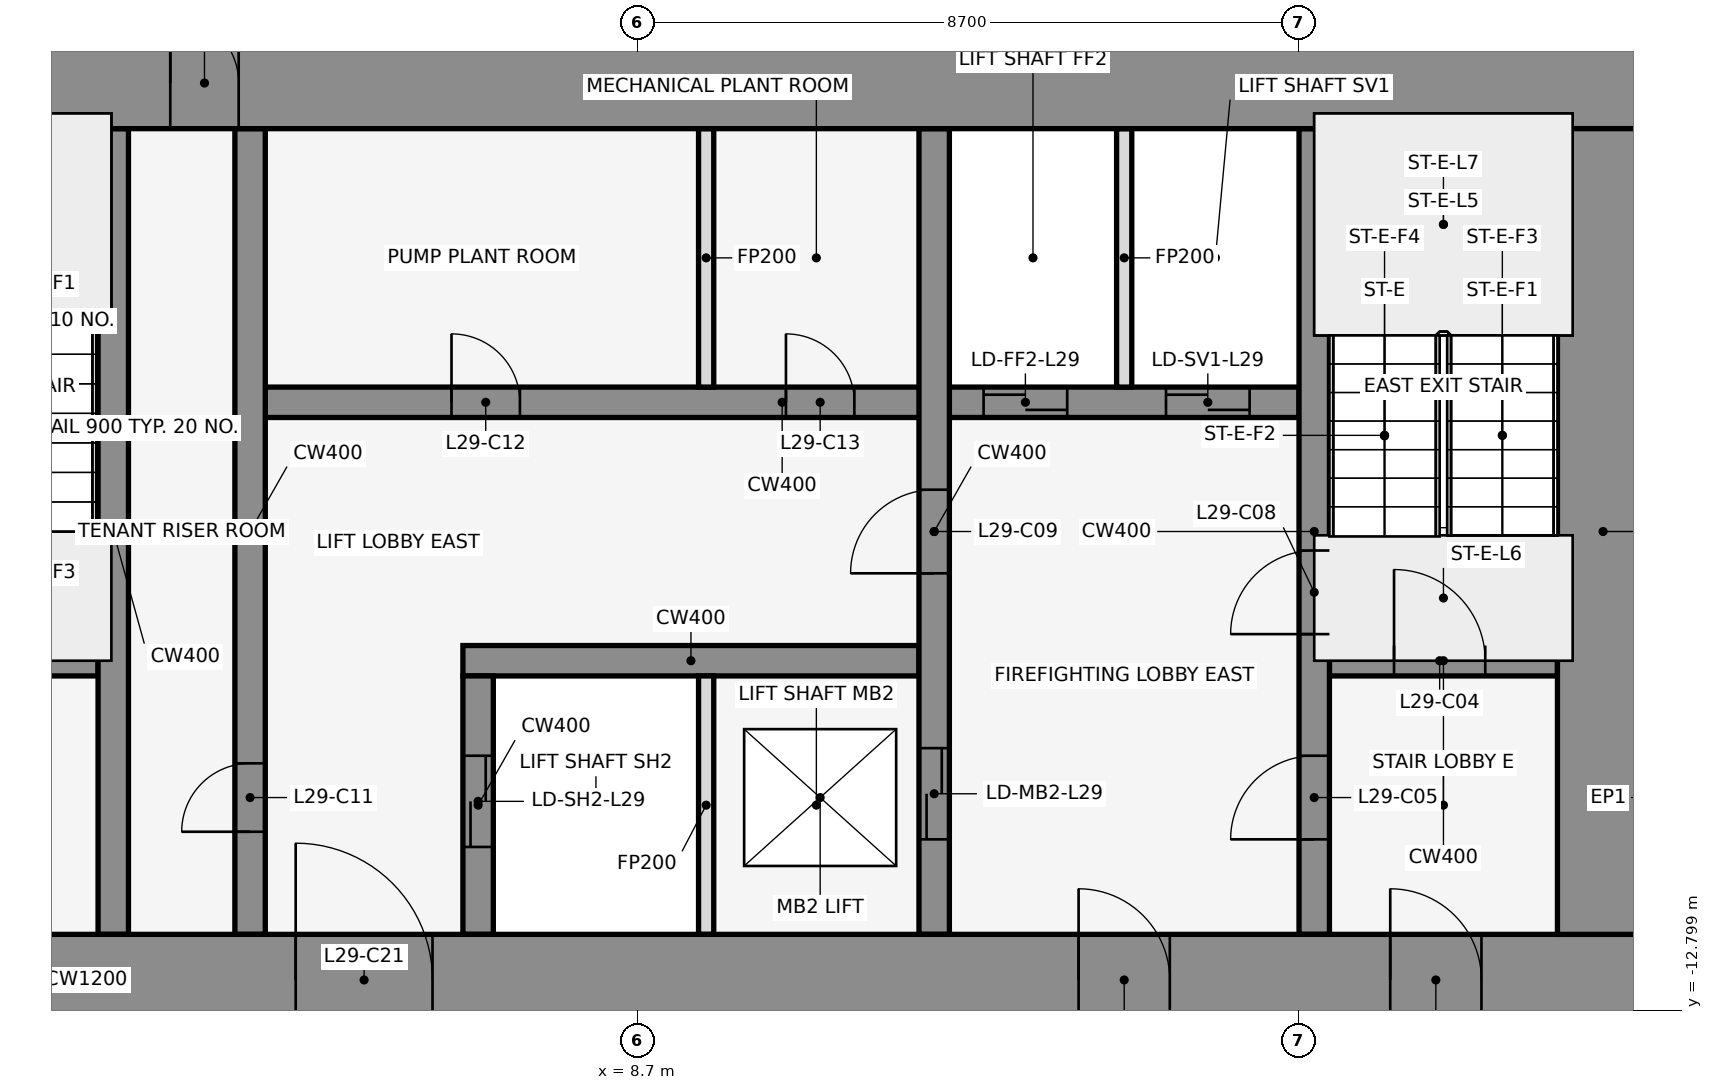
"""IFC4 building model, lengths in metres.
Left out: names, types, materials, properties, quantities, classifications, styles, units other than length and angle.
Written with IfcOpenShell. Run it as: python <this file> out.ifc"""

import sys

from ifc_helpers import new_model, si_unit, direction, frame, frame_2d, origin, place, context, subcontext, project, spatial, rectangle, extrude, element, fill, save


model = new_model("IFC4")
c1 = context("Model", 3, precision=1e-05, world=origin(), true_north=direction((0.0, 1.0)))
c2 = subcontext(c1, "Body", "Model", "MODEL_VIEW")
j1 = project(units=[si_unit("LENGTHUNIT", "METRE"), si_unit("PLANEANGLEUNIT", "RADIAN")], contexts=[c1])
p1 = place(None, origin())
s1 = spatial("IfcSite", under=j1, at=p1, CompositionType="ELEMENT")
p2 = place(p1, origin())
s2 = spatial("IfcBuilding", under=s1, at=p2, CompositionType="ELEMENT")
p3 = place(p2, frame((0.0, 0.0, 135.0)))
s3 = spatial("IfcBuildingStorey", under=s2, at=p3, CompositionType="ELEMENT", Elevation=135.0)
for number, where, z_axis, x_axis in (
    (1, (16.432, -0.105, 0.0), (0.0, 0.0, 1.0), (-0.84, 0.543, 0.0)),
    (2, (1.901, 1.08, 0.0), (0.0, 0.0, 1.0), (-0.84, -0.543, 0.0)),
):
    element("IfcWall", number, at=place(p3, frame(where, z_axis=z_axis, x_axis=x_axis)), inside=s3, PredefinedType="STANDARD", context=c2, shape_type="SweptSolid", body=[
        extrude(rectangle(XDim=2.183, YDim=0.25, at=frame_2d((1.091, 0.0))), origin(), (0.0, 0.0, 1.0), 5.25),
    ])
p4 = place(p3, frame((-1.6, -8.2, 0.0), z_axis=(0.0, 0.0, 1.0), x_axis=(1.0, 0.0, 0.0)))
e3 = element("IfcWall", 3, at=p4, inside=s3, PredefinedType="SHEAR", context=c2, shape_type="SweptSolid", body=[
    extrude(rectangle(XDim=3.2, YDim=0.4, at=frame_2d((1.6, 0.0))), origin(), (0.0, 0.0, 1.0), 5.4),
])
p5 = place(p4, frame((1.05, 0.0, 0.0)))
e4 = element("IfcOpeningElement", 4, at=p5, cuts=e3, PredefinedType="OPENING", context=c2, shape_type="SweptSolid", body=[
    extrude(rectangle(XDim=1.2, YDim=2.1, at=frame_2d((0.6, 1.05))), frame((0.0, 0.212, 0.0), z_axis=(0.0, -1.0, 0.0), x_axis=(1.0, 0.0, 0.0)), (0.0, 0.0, 1.0), 0.424),
])
p6 = place(p3, frame((6.4, -8.2, 0.0), z_axis=(0.0, 0.0, 1.0), x_axis=(1.0, 0.0, 0.0)))
e5 = element("IfcWall", 5, at=p6, inside=s3, PredefinedType="SHEAR", context=c2, shape_type="SweptSolid", body=[
    extrude(rectangle(XDim=6.0, YDim=0.4, at=frame_2d((3.0, 0.0))), origin(), (0.0, 0.0, 1.0), 5.4),
])
p7 = place(p3, frame((17.8, -8.2, 0.0), z_axis=(0.0, 0.0, 1.0), x_axis=(1.0, 0.0, 0.0)))
e6 = element("IfcWall", 6, at=p7, inside=s3, PredefinedType="SHEAR", context=c2, shape_type="SweptSolid", body=[
    extrude(rectangle(XDim=3.0, YDim=0.4, at=frame_2d((1.5, 0.0))), origin(), (0.0, 0.0, 1.0), 5.4),
])
p8 = place(p7, frame((0.85, 0.0, 0.0)))
e7 = element("IfcOpeningElement", 7, at=p8, cuts=e6, PredefinedType="OPENING", context=c2, shape_type="SweptSolid", body=[
    extrude(rectangle(XDim=1.2, YDim=2.1, at=frame_2d((0.6, 1.05))), frame((0.0, 0.212, 0.0), z_axis=(0.0, -1.0, 0.0), x_axis=(1.0, 0.0, 0.0)), (0.0, 0.0, 1.0), 0.424),
])
p9 = place(p3, frame((3.8, -4.8, 0.0), z_axis=(0.0, 0.0, 1.0), x_axis=(1.0, 0.0, 0.0)))
e8 = element("IfcWall", 8, at=p9, inside=s3, PredefinedType="SHEAR", context=c2, shape_type="SweptSolid", body=[
    extrude(rectangle(XDim=13.6, YDim=0.4, at=frame_2d((6.8, 0.0))), origin(), (0.0, 0.0, 1.0), 5.4),
])
p10 = place(p9, frame((9.45, 0.0, 0.0)))
e9 = element("IfcOpeningElement", 9, at=p10, cuts=e8, PredefinedType="OPENING", context=c2, shape_type="SweptSolid", body=[
    extrude(rectangle(XDim=1.1, YDim=2.1, at=frame_2d((0.55, 1.05))), frame((0.0, 0.212, 0.0), z_axis=(0.0, -1.0, 0.0), x_axis=(1.0, 0.0, 0.0)), (0.0, 0.0, 1.0), 0.424),
])
p11 = place(p9, frame((11.85, 0.0, 0.0)))
e10 = element("IfcOpeningElement", 10, at=p11, cuts=e8, PredefinedType="OPENING", context=c2, shape_type="SweptSolid", body=[
    extrude(rectangle(XDim=1.1, YDim=2.1, at=frame_2d((0.55, 1.05))), frame((0.0, 0.212, 0.0), z_axis=(0.0, -1.0, 0.0), x_axis=(1.0, 0.0, 0.0)), (0.0, 0.0, 1.0), 0.424),
])
p12 = place(p9, frame((2.45, 0.0, 0.0)))
e11 = element("IfcOpeningElement", 11, at=p12, cuts=e8, PredefinedType="OPENING", context=c2, shape_type="SweptSolid", body=[
    extrude(rectangle(XDim=0.9, YDim=2.1, at=frame_2d((0.45, 1.05))), frame((0.0, 0.212, 0.0), z_axis=(0.0, -1.0, 0.0), x_axis=(1.0, 0.0, 0.0)), (0.0, 0.0, 1.0), 0.424),
])
p13 = place(p9, frame((6.85, 0.0, 0.0)))
e12 = element("IfcOpeningElement", 12, at=p13, cuts=e8, PredefinedType="OPENING", context=c2, shape_type="SweptSolid", body=[
    extrude(rectangle(XDim=0.9, YDim=2.1, at=frame_2d((0.45, 1.05))), frame((0.0, 0.212, 0.0), z_axis=(0.0, -1.0, 0.0), x_axis=(1.0, 0.0, 0.0)), (0.0, 0.0, 1.0), 0.424),
])
p14 = place(p3, frame((1.8, -11.8, 0.0), z_axis=(0.0, 0.0, 1.0), x_axis=(0.0, 1.0, 0.0)))
e13 = element("IfcWall", 13, at=p14, inside=s3, PredefinedType="SHEAR", context=c2, shape_type="SweptSolid", body=[
    extrude(rectangle(XDim=10.6, YDim=0.4, at=frame_2d((5.3, 0.0))), origin(), (0.0, 0.0, 1.0), 5.4),
])
p15 = place(p3, frame((3.6, -11.8, 0.0), z_axis=(0.0, 0.0, 1.0), x_axis=(0.0, 1.0, 0.0)))
e14 = element("IfcWall", 14, at=p15, inside=s3, PredefinedType="SHEAR", context=c2, shape_type="SweptSolid", body=[
    extrude(rectangle(XDim=10.6, YDim=0.4, at=frame_2d((5.3, 0.0))), origin(), (0.0, 0.0, 1.0), 5.4),
])
p16 = place(p15, frame((1.35, 0.0, 0.0)))
e15 = element("IfcOpeningElement", 15, at=p16, cuts=e14, PredefinedType="OPENING", context=c2, shape_type="SweptSolid", body=[
    extrude(rectangle(XDim=0.9, YDim=2.1, at=frame_2d((0.45, 1.05))), frame((0.0, 0.212, 0.0), z_axis=(0.0, -1.0, 0.0), x_axis=(1.0, 0.0, 0.0)), (0.0, 0.0, 1.0), 0.424),
])
p17 = place(p3, frame((6.6, -11.8, 0.0), z_axis=(0.0, 0.0, 1.0), x_axis=(0.0, 1.0, 0.0)))
e16 = element("IfcWall", 16, at=p17, inside=s3, PredefinedType="SHEAR", context=c2, shape_type="SweptSolid", body=[
    extrude(rectangle(XDim=3.4, YDim=0.4, at=frame_2d((1.7, 0.0))), origin(), (0.0, 0.0, 1.0), 5.4),
])
p18 = place(p17, frame((1.15, 0.0, 0.0)))
e17 = element("IfcOpeningElement", 17, at=p18, cuts=e16, PredefinedType="OPENING", context=c2, shape_type="SweptSolid", body=[
    extrude(rectangle(XDim=1.2, YDim=2.1, at=frame_2d((0.6, 1.05))), frame((0.0, 0.212, 0.0), z_axis=(0.0, -1.0, 0.0), x_axis=(1.0, 0.0, 0.0)), (0.0, 0.0, 1.0), 0.424),
])
for number, where, z_axis, x_axis in (
    (18, (9.6, -11.8, 0.0), (0.0, 0.0, 1.0), (0.0, 1.0, 0.0)),
    (19, (9.6, -4.6, 0.0), (0.0, 0.0, 1.0), (0.0, 1.0, 0.0)),
):
    element("IfcWall", number, at=place(p3, frame(where, z_axis=z_axis, x_axis=x_axis)), inside=s3, PredefinedType="PARTITIONING", context=c2, shape_type="SweptSolid", body=[
        extrude(rectangle(XDim=3.4, YDim=0.2, at=frame_2d((1.7, 0.0))), origin(), (0.0, 0.0, 1.0), 4.24),
    ])
p19 = place(p3, frame((12.6, -11.8, 0.0), z_axis=(0.0, 0.0, 1.0), x_axis=(0.0, 1.0, 0.0)))
e20 = element("IfcWall", 20, at=p19, inside=s3, PredefinedType="SHEAR", context=c2, shape_type="SweptSolid", body=[
    extrude(rectangle(XDim=10.6, YDim=0.4, at=frame_2d((5.3, 0.0))), origin(), (0.0, 0.0, 1.0), 5.4),
])
p20 = place(p19, frame((1.25, 0.0, 0.0)))
e21 = element("IfcOpeningElement", 21, at=p20, cuts=e20, PredefinedType="OPENING", context=c2, shape_type="SweptSolid", body=[
    extrude(rectangle(XDim=1.2, YDim=2.1, at=frame_2d((0.6, 1.05))), frame((0.0, 0.212, 0.0), z_axis=(0.0, -1.0, 0.0), x_axis=(1.0, 0.0, 0.0)), (0.0, 0.0, 1.0), 0.424),
])
p21 = place(p19, frame((4.75, 0.0, 0.0)))
e22 = element("IfcOpeningElement", 22, at=p21, cuts=e20, PredefinedType="OPENING", context=c2, shape_type="SweptSolid", body=[
    extrude(rectangle(XDim=1.1, YDim=2.1, at=frame_2d((0.55, 1.05))), frame((0.0, 0.212, 0.0), z_axis=(0.0, -1.0, 0.0), x_axis=(1.0, 0.0, 0.0)), (0.0, 0.0, 1.0), 0.424),
])
p22 = place(p3, frame((15.1, -4.6, 0.0), z_axis=(0.0, 0.0, 1.0), x_axis=(0.0, 1.0, 0.0)))
e23 = element("IfcWall", 23, at=p22, inside=s3, PredefinedType="PARTITIONING", context=c2, shape_type="SweptSolid", body=[
    extrude(rectangle(XDim=3.4, YDim=0.2, at=frame_2d((1.7, 0.0))), origin(), (0.0, 0.0, 1.0), 4.24),
])
p23 = place(p3, frame((17.6, -11.8, 0.0), z_axis=(0.0, 0.0, 1.0), x_axis=(0.0, 1.0, 0.0)))
e24 = element("IfcWall", 24, at=p23, inside=s3, PredefinedType="SHEAR", context=c2, shape_type="SweptSolid", body=[
    extrude(rectangle(XDim=10.6, YDim=0.4, at=frame_2d((5.3, 0.0))), origin(), (0.0, 0.0, 1.0), 5.4),
])
p24 = place(p23, frame((1.25, 0.0, 0.0)))
e25 = element("IfcOpeningElement", 25, at=p24, cuts=e24, PredefinedType="OPENING", context=c2, shape_type="SweptSolid", body=[
    extrude(rectangle(XDim=1.1, YDim=2.1, at=frame_2d((0.55, 1.05))), frame((0.0, 0.212, 0.0), z_axis=(0.0, -1.0, 0.0), x_axis=(1.0, 0.0, 0.0)), (0.0, 0.0, 1.0), 0.424),
])
p25 = place(p23, frame((3.95, 0.0, 0.0)))
e26 = element("IfcOpeningElement", 26, at=p25, cuts=e24, PredefinedType="OPENING", context=c2, shape_type="SweptSolid", body=[
    extrude(rectangle(XDim=1.1, YDim=2.1, at=frame_2d((0.55, 1.05))), frame((0.0, 0.212, 0.0), z_axis=(0.0, -1.0, 0.0), x_axis=(1.0, 0.0, 0.0)), (0.0, 0.0, 1.0), 0.424),
])
p26 = place(p3, frame((-22.0, -0.6, 0.0), z_axis=(0.0, 0.0, 1.0), x_axis=(1.0, 0.0, 0.0)))
e27 = element("IfcWall", 27, at=p26, inside=s3, PredefinedType="SHEAR", context=c2, shape_type="SweptSolid", body=[
    extrude(rectangle(XDim=44.0, YDim=1.2, at=frame_2d((22.0, 0.0))), origin(), (0.0, 0.0, 1.0), 5.4),
])
p27 = place(p26, frame((18.55, 0.0, 0.0)))
e28 = element("IfcOpeningElement", 28, at=p27, cuts=e27, PredefinedType="OPENING", context=c2, shape_type="SweptSolid", body=[
    extrude(rectangle(XDim=0.9, YDim=2.1, at=frame_2d((0.45, 1.05))), frame((0.0, 0.612, 0.0), z_axis=(0.0, -1.0, 0.0), x_axis=(1.0, 0.0, 0.0)), (0.0, 0.0, 1.0), 1.224),
])
p28 = place(p26, frame((24.55, 0.0, 0.0)))
e29 = element("IfcOpeningElement", 29, at=p28, cuts=e27, PredefinedType="OPENING", context=c2, shape_type="SweptSolid", body=[
    extrude(rectangle(XDim=0.9, YDim=2.1, at=frame_2d((0.45, 1.05))), frame((0.0, 0.612, 0.0), z_axis=(0.0, -1.0, 0.0), x_axis=(1.0, 0.0, 0.0)), (0.0, 0.0, 1.0), 1.224),
])
p29 = place(p3, frame((-22.0, -12.4, 0.0), z_axis=(0.0, 0.0, 1.0), x_axis=(1.0, 0.0, 0.0)))
e30 = element("IfcWall", 30, at=p29, inside=s3, PredefinedType="SHEAR", context=c2, shape_type="SweptSolid", body=[
    extrude(rectangle(XDim=44.0, YDim=1.2, at=frame_2d((22.0, 0.0))), origin(), (0.0, 0.0, 1.0), 5.4),
])
p30 = place(p29, frame((2.2, 0.0, 0.0)))
e31 = element("IfcOpeningElement", 31, at=p30, cuts=e30, PredefinedType="OPENING", context=c2, shape_type="SweptSolid", body=[
    extrude(rectangle(XDim=1.2, YDim=2.1, at=frame_2d((0.6, 1.05))), frame((0.0, 0.612, 0.0), z_axis=(0.0, -1.0, 0.0), x_axis=(1.0, 0.0, 0.0)), (0.0, 0.0, 1.0), 1.224),
])
p31 = place(p29, frame((21.4, 0.0, 0.0)))
e32 = element("IfcOpeningElement", 32, at=p31, cuts=e30, PredefinedType="OPENING", context=c2, shape_type="SweptSolid", body=[
    extrude(rectangle(XDim=1.2, YDim=2.1, at=frame_2d((0.6, 1.05))), frame((0.0, 0.612, 0.0), z_axis=(0.0, -1.0, 0.0), x_axis=(1.0, 0.0, 0.0)), (0.0, 0.0, 1.0), 1.224),
])
p32 = place(p29, frame((40.6, 0.0, 0.0)))
e33 = element("IfcOpeningElement", 33, at=p32, cuts=e30, PredefinedType="OPENING", context=c2, shape_type="SweptSolid", body=[
    extrude(rectangle(XDim=1.2, YDim=2.1, at=frame_2d((0.6, 1.05))), frame((0.0, 0.612, 0.0), z_axis=(0.0, -1.0, 0.0), x_axis=(1.0, 0.0, 0.0)), (0.0, 0.0, 1.0), 1.224),
])
p33 = place(p29, frame((16.0, 0.0, 0.0)))
e34 = element("IfcOpeningElement", 34, at=p33, cuts=e30, PredefinedType="OPENING", context=c2, shape_type="SweptSolid", body=[
    extrude(rectangle(XDim=1.8, YDim=2.1, at=frame_2d((0.9, 1.05))), frame((0.0, 0.612, 0.0), z_axis=(0.0, -1.0, 0.0), x_axis=(1.0, 0.0, 0.0)), (0.0, 0.0, 1.0), 1.224),
])
p34 = place(p29, frame((6.3, 0.0, 0.0)))
e35 = element("IfcOpeningElement", 35, at=p34, cuts=e30, PredefinedType="OPENING", context=c2, shape_type="SweptSolid", body=[
    extrude(rectangle(XDim=1.2, YDim=2.1, at=frame_2d((0.6, 1.05))), frame((0.0, 0.612, 0.0), z_axis=(0.0, -1.0, 0.0), x_axis=(1.0, 0.0, 0.0)), (0.0, 0.0, 1.0), 1.224),
])
p35 = place(p29, frame((26.2, 0.0, 0.0)))
e36 = element("IfcOpeningElement", 36, at=p35, cuts=e30, PredefinedType="OPENING", context=c2, shape_type="SweptSolid", body=[
    extrude(rectangle(XDim=1.8, YDim=2.1, at=frame_2d((0.9, 1.05))), frame((0.0, 0.612, 0.0), z_axis=(0.0, -1.0, 0.0), x_axis=(1.0, 0.0, 0.0)), (0.0, 0.0, 1.0), 1.224),
])
p36 = place(p29, frame((36.5, 0.0, 0.0)))
e37 = element("IfcOpeningElement", 37, at=p36, cuts=e30, PredefinedType="OPENING", context=c2, shape_type="SweptSolid", body=[
    extrude(rectangle(XDim=1.2, YDim=2.1, at=frame_2d((0.6, 1.05))), frame((0.0, 0.612, 0.0), z_axis=(0.0, -1.0, 0.0), x_axis=(1.0, 0.0, 0.0)), (0.0, 0.0, 1.0), 1.224),
])
p37 = place(p3, frame((21.4, -11.8, 0.0), z_axis=(0.0, 0.0, 1.0), x_axis=(0.0, 1.0, 0.0)))
e38 = element("IfcWall", 38, at=p37, inside=s3, PredefinedType="SHEAR", context=c2, shape_type="SweptSolid", body=[
    extrude(rectangle(XDim=10.6, YDim=1.2, at=frame_2d((5.3, 0.0))), origin(), (0.0, 0.0, 1.0), 5.4),
])
p38 = place(p8, origin())
e39 = element("IfcDoor", 39, at=p38, inside=s3, OperationType="SINGLE_SWING_RIGHT", PredefinedType="DOOR", context=c2, shape_type="SweptSolid", body=[
    extrude(rectangle(XDim=1.2, YDim=2.1, at=frame_2d((0.6, 1.05))), frame((0.0, 0.025, 0.0), z_axis=(0.0, -1.0, 0.0), x_axis=(1.0, 0.0, 0.0)), (0.0, 0.0, 1.0), 0.05),
])
fill(e7, e39)
p39 = place(p24, origin())
e40 = element("IfcDoor", 40, at=p39, inside=s3, OperationType="SINGLE_SWING_LEFT", PredefinedType="DOOR", context=c2, shape_type="SweptSolid", body=[
    extrude(rectangle(XDim=1.1, YDim=2.1, at=frame_2d((0.55, 1.05))), frame((0.0, 0.025, 0.0), z_axis=(0.0, -1.0, 0.0), x_axis=(1.0, 0.0, 0.0)), (0.0, 0.0, 1.0), 0.05),
])
fill(e25, e40)
p40 = place(p18, origin())
e41 = element("IfcDoor", 41, at=p40, inside=s3, OperationType="DOUBLE_DOOR_SLIDING", PredefinedType="DOOR", context=c2, shape_type="SweptSolid", body=[
    extrude(rectangle(XDim=1.2, YDim=2.1, at=frame_2d((0.6, 1.05))), frame((0.0, 0.025, 0.0), z_axis=(0.0, -1.0, 0.0), x_axis=(1.0, 0.0, 0.0)), (0.0, 0.0, 1.0), 0.05),
])
fill(e17, e41)
p41 = place(p20, origin())
e42 = element("IfcDoor", 42, at=p41, inside=s3, OperationType="DOUBLE_DOOR_SLIDING", PredefinedType="DOOR", context=c2, shape_type="SweptSolid", body=[
    extrude(rectangle(XDim=1.2, YDim=2.1, at=frame_2d((0.6, 1.05))), frame((0.0, 0.025, 0.0), z_axis=(0.0, -1.0, 0.0), x_axis=(1.0, 0.0, 0.0)), (0.0, 0.0, 1.0), 0.05),
])
fill(e21, e42)
p42 = place(p10, origin())
e43 = element("IfcDoor", 43, at=p42, inside=s3, OperationType="DOUBLE_DOOR_SLIDING", PredefinedType="DOOR", context=c2, shape_type="SweptSolid", body=[
    extrude(rectangle(XDim=1.1, YDim=2.1, at=frame_2d((0.55, 1.05))), frame((0.0, 0.025, 0.0), z_axis=(0.0, -1.0, 0.0), x_axis=(1.0, 0.0, 0.0)), (0.0, 0.0, 1.0), 0.05),
])
fill(e9, e43)
p43 = place(p11, origin())
e44 = element("IfcDoor", 44, at=p43, inside=s3, OperationType="DOUBLE_DOOR_SLIDING", PredefinedType="DOOR", context=c2, shape_type="SweptSolid", body=[
    extrude(rectangle(XDim=1.1, YDim=2.1, at=frame_2d((0.55, 1.05))), frame((0.0, 0.025, 0.0), z_axis=(0.0, -1.0, 0.0), x_axis=(1.0, 0.0, 0.0)), (0.0, 0.0, 1.0), 0.05),
])
fill(e10, e44)
p44 = place(p25, origin())
e45 = element("IfcDoor", 45, at=p44, inside=s3, OperationType="SINGLE_SWING_RIGHT", PredefinedType="DOOR", context=c2, shape_type="SweptSolid", body=[
    extrude(rectangle(XDim=1.1, YDim=2.1, at=frame_2d((0.55, 1.05))), frame((0.0, 0.025, 0.0), z_axis=(0.0, -1.0, 0.0), x_axis=(1.0, 0.0, 0.0)), (0.0, 0.0, 1.0), 0.05),
])
fill(e26, e45)
p45 = place(p21, frame((1.1, 0.0, 0.0), z_axis=(0.0, 0.0, 1.0), x_axis=(-1.0, 0.0, 0.0)))
e46 = element("IfcDoor", 46, at=p45, inside=s3, OperationType="SINGLE_SWING_RIGHT", PredefinedType="DOOR", context=c2, shape_type="SweptSolid", body=[
    extrude(rectangle(XDim=1.1, YDim=2.1, at=frame_2d((0.55, 1.05))), frame((0.0, 0.025, 0.0), z_axis=(0.0, -1.0, 0.0), x_axis=(1.0, 0.0, 0.0)), (0.0, 0.0, 1.0), 0.05),
])
fill(e22, e46)
p46 = place(p16, origin())
e47 = element("IfcDoor", 47, at=p46, inside=s3, OperationType="SINGLE_SWING_LEFT", PredefinedType="DOOR", context=c2, shape_type="SweptSolid", body=[
    extrude(rectangle(XDim=0.9, YDim=2.1, at=frame_2d((0.45, 1.05))), frame((0.0, 0.025, 0.0), z_axis=(0.0, -1.0, 0.0), x_axis=(1.0, 0.0, 0.0)), (0.0, 0.0, 1.0), 0.05),
])
fill(e15, e47)
p47 = place(p12, origin())
e48 = element("IfcDoor", 48, at=p47, inside=s3, OperationType="SINGLE_SWING_RIGHT", PredefinedType="DOOR", context=c2, shape_type="SweptSolid", body=[
    extrude(rectangle(XDim=0.9, YDim=2.1, at=frame_2d((0.45, 1.05))), frame((0.0, 0.025, 0.0), z_axis=(0.0, -1.0, 0.0), x_axis=(1.0, 0.0, 0.0)), (0.0, 0.0, 1.0), 0.05),
])
fill(e11, e48)
p48 = place(p13, origin())
e49 = element("IfcDoor", 49, at=p48, inside=s3, OperationType="SINGLE_SWING_LEFT", PredefinedType="DOOR", context=c2, shape_type="SweptSolid", body=[
    extrude(rectangle(XDim=0.9, YDim=2.1, at=frame_2d((0.45, 1.05))), frame((0.0, 0.025, 0.0), z_axis=(0.0, -1.0, 0.0), x_axis=(1.0, 0.0, 0.0)), (0.0, 0.0, 1.0), 0.05),
])
fill(e12, e49)
p49 = place(p28, origin())
e50 = element("IfcDoor", 50, at=p49, inside=s3, OperationType="SINGLE_SWING_LEFT", PredefinedType="DOOR", context=c2, shape_type="SweptSolid", body=[
    extrude(rectangle(XDim=0.9, YDim=2.1, at=frame_2d((0.45, 1.05))), frame((0.0, 0.025, 0.0), z_axis=(0.0, -1.0, 0.0), x_axis=(1.0, 0.0, 0.0)), (0.0, 0.0, 1.0), 0.05),
])
fill(e29, e50)
p50 = place(p32, frame((1.2, 0.0, 0.0), z_axis=(0.0, 0.0, 1.0), x_axis=(-1.0, 0.0, 0.0)))
e51 = element("IfcDoor", 51, at=p50, inside=s3, OperationType="SINGLE_SWING_RIGHT", PredefinedType="DOOR", context=c2, shape_type="SweptSolid", body=[
    extrude(rectangle(XDim=1.2, YDim=2.1, at=frame_2d((0.6, 1.05))), frame((0.0, 0.025, 0.0), z_axis=(0.0, -1.0, 0.0), x_axis=(1.0, 0.0, 0.0)), (0.0, 0.0, 1.0), 0.05),
])
fill(e33, e51)
p51 = place(p35, origin())
e52 = element("IfcDoor", 52, at=p51, inside=s3, OperationType="SINGLE_SWING_LEFT", PredefinedType="DOOR", context=c2, shape_type="SweptSolid", body=[
    extrude(rectangle(XDim=1.8, YDim=2.1, at=frame_2d((0.9, 1.05))), frame((0.0, 0.025, 0.0), z_axis=(0.0, -1.0, 0.0), x_axis=(1.0, 0.0, 0.0)), (0.0, 0.0, 1.0), 0.05),
])
fill(e36, e52)
p52 = place(p36, frame((1.2, 0.0, 0.0), z_axis=(0.0, 0.0, 1.0), x_axis=(-1.0, 0.0, 0.0)))
e53 = element("IfcDoor", 53, at=p52, inside=s3, OperationType="SINGLE_SWING_RIGHT", PredefinedType="DOOR", context=c2, shape_type="SweptSolid", body=[
    extrude(rectangle(XDim=1.2, YDim=2.1, at=frame_2d((0.6, 1.05))), frame((0.0, 0.025, 0.0), z_axis=(0.0, -1.0, 0.0), x_axis=(1.0, 0.0, 0.0)), (0.0, 0.0, 1.0), 0.05),
])
fill(e37, e53)
save(model, sys.argv[1])
